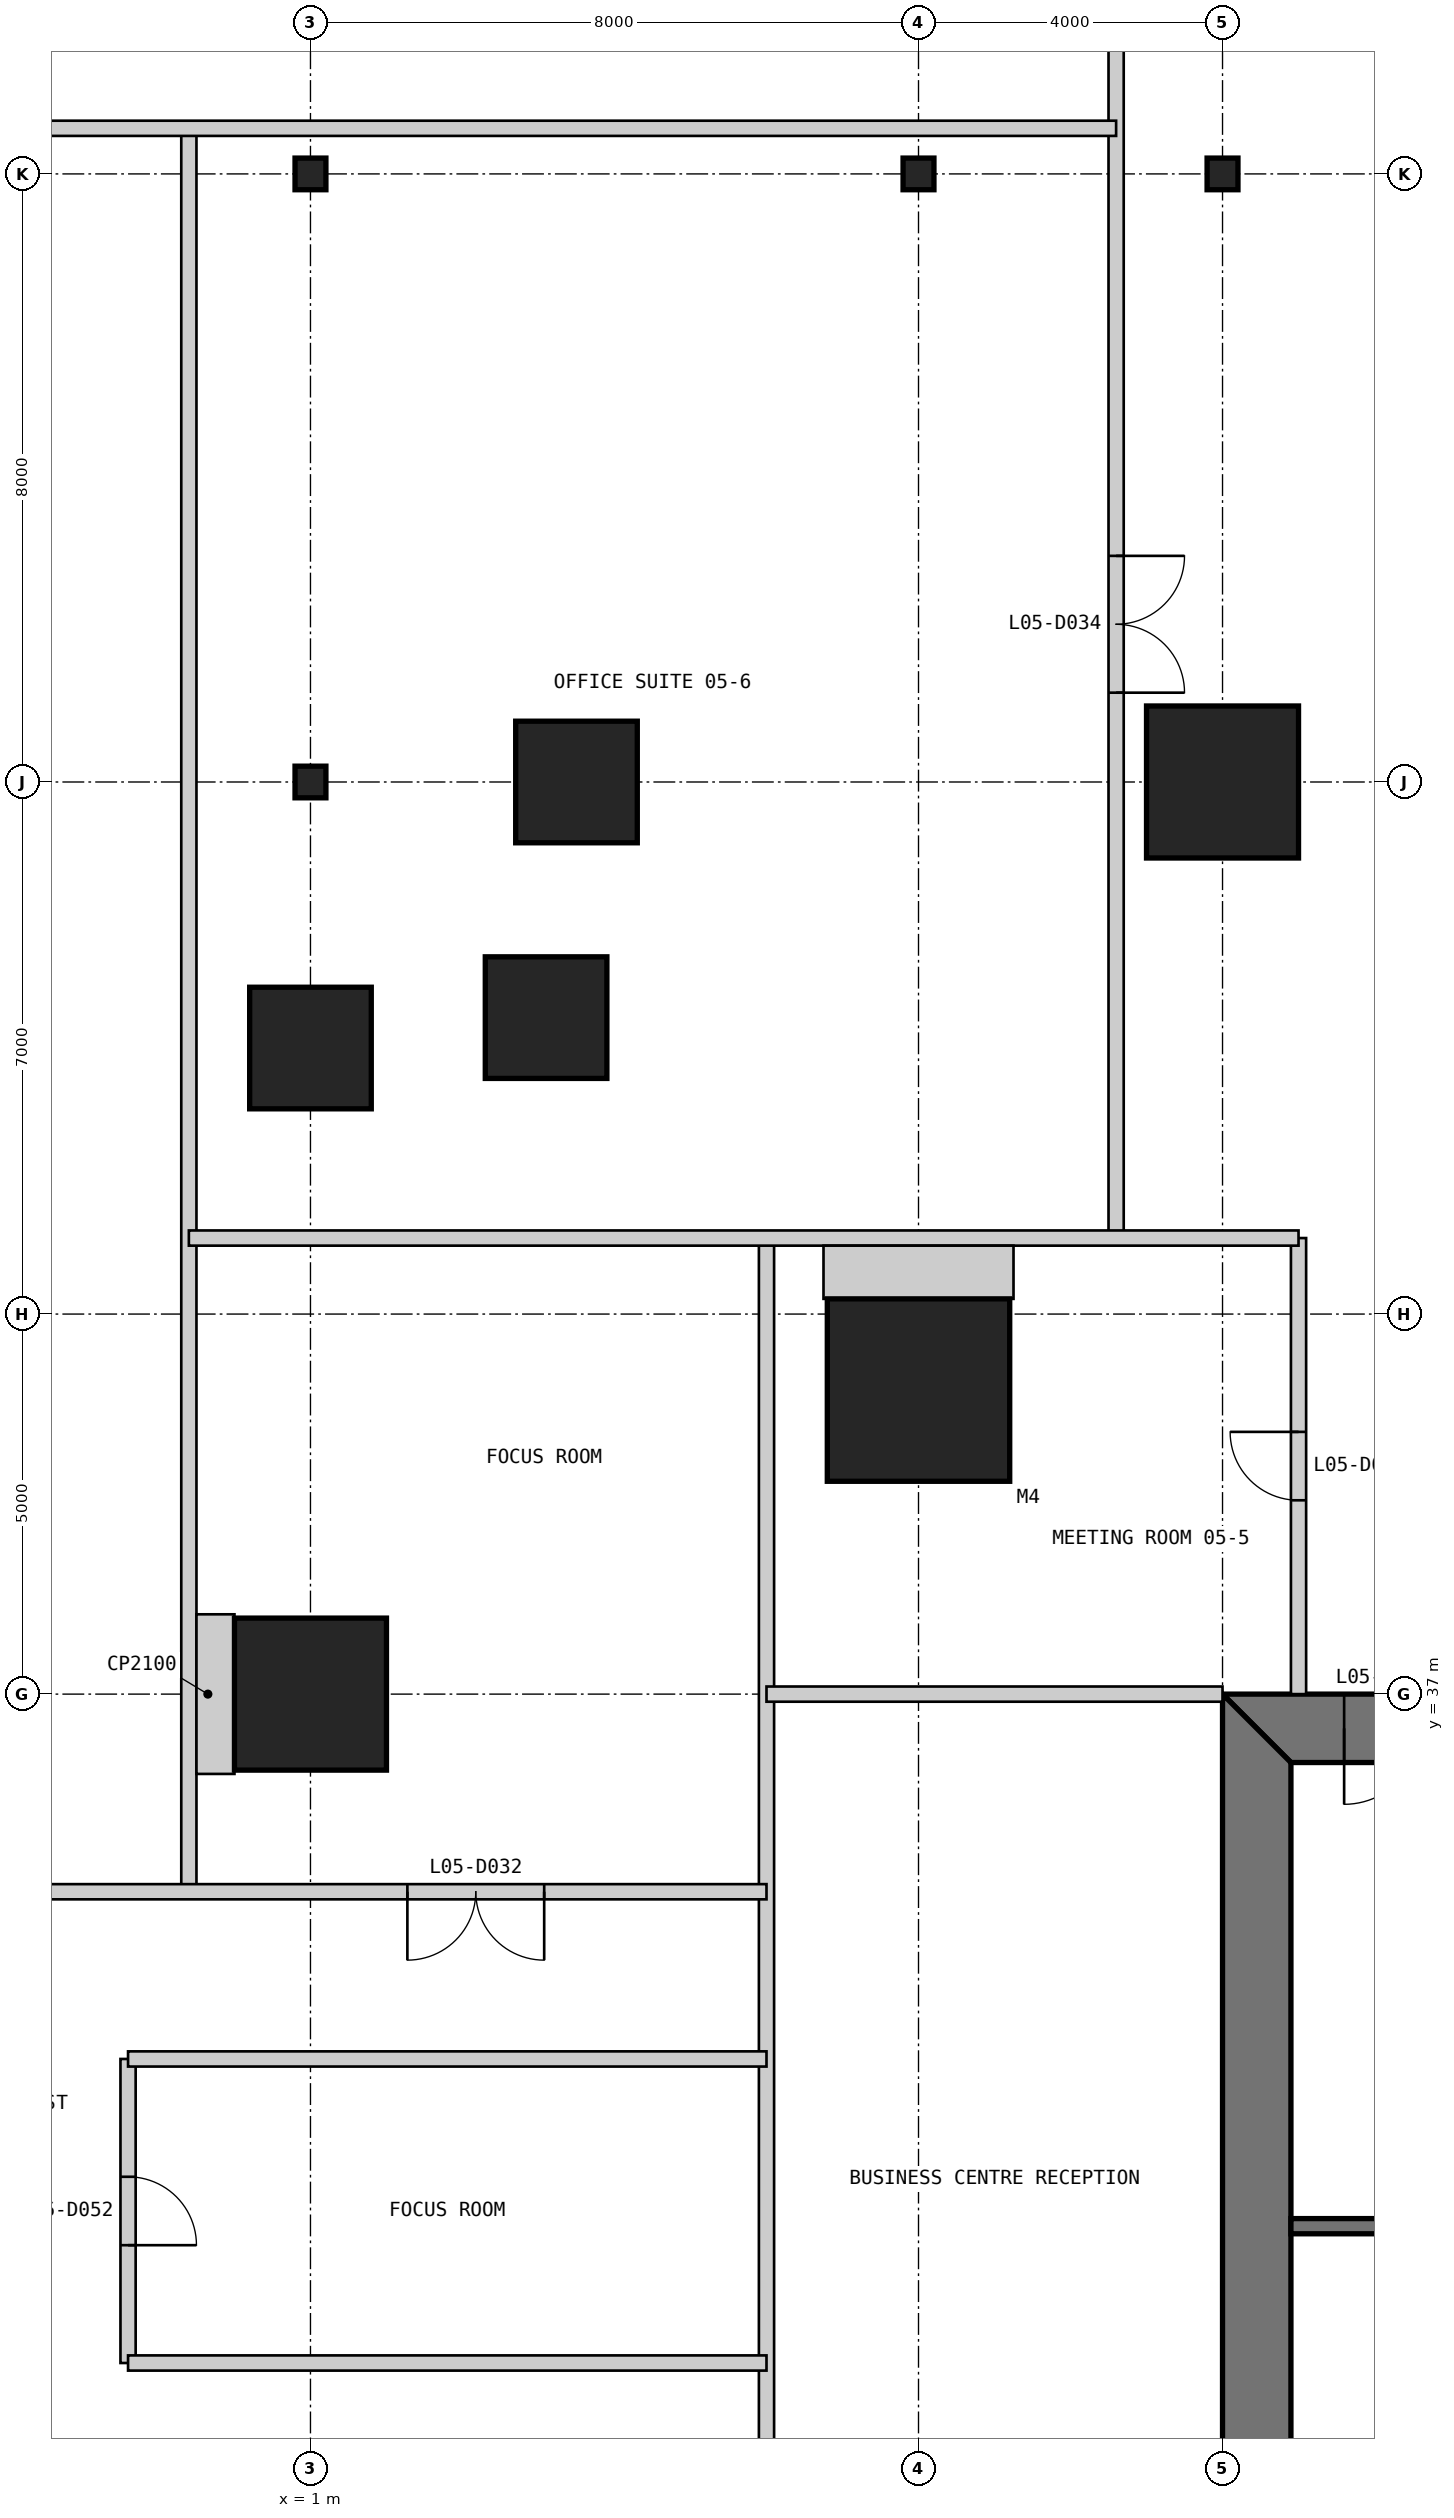
"""IFC4 building model, lengths in metres.
Left out: names, types, materials, properties, quantities, classifications, styles, units other than length and angle.
Written with IfcOpenShell. Run it as: python <this file> out.ifc"""

import sys

from ifc_helpers import new_model, si_unit, direction, frame, frame_2d, origin, origin_2d, place, context, subcontext, project, spatial, polyline, rectangle, i_section, outline, extrude, element, fill, save


model = new_model("IFC4")
c1 = context("Model", 3, precision=1e-05, world=origin(), true_north=direction((0.0, 1.0)))
c2 = subcontext(c1, "Body", "Model", "MODEL_VIEW")
j1 = project(units=[si_unit("LENGTHUNIT", "METRE"), si_unit("PLANEANGLEUNIT", "RADIAN")], contexts=[c1])
p1 = place(None, origin())
s1 = spatial("IfcSite", under=j1, at=p1, CompositionType="ELEMENT")
p2 = place(p1, origin())
s2 = spatial("IfcBuilding", under=s1, at=p2, CompositionType="ELEMENT")
p3 = place(p2, frame((0.0, 0.0, 26.2)))
s3 = spatial("IfcBuildingStorey", under=s2, at=p3, CompositionType="ELEMENT", Elevation=26.2)
p4 = place(p3, frame((9.0, 41.0, 0.0), z_axis=(0.0, 0.0, 1.0), x_axis=(1.0, 0.0, 0.0)))
e1 = element("IfcColumn", 1, at=p4, inside=s3, PredefinedType="COLUMN", context=c2, shape_type="SweptSolid", body=[
    extrude(rectangle(XDim=2.4, YDim=2.4, at=origin_2d()), origin(), (0.0, 0.0, 1.0), 4.8),
])
p5 = place(p3, frame((13.0, 49.0, 0.0), z_axis=(0.0, 0.0, 1.0), x_axis=(1.0, 0.0, 0.0)))
e2 = element("IfcColumn", 2, at=p5, inside=s3, PredefinedType="COLUMN", context=c2, shape_type="SweptSolid", body=[
    extrude(rectangle(XDim=2.0, YDim=2.0, at=origin_2d()), origin(), (0.0, 0.0, 1.0), 4.8),
])
for number, where, z_axis, x_axis in (
    (3, (4.5, 49.0, 0.0), (0.0, 0.0, 1.0), (1.0, 0.0, 0.0)),
    (4, (4.1, 45.9, 0.0), (0.0, 0.0, 1.0), (1.0, 0.0, 0.0)),
    (5, (1.0, 45.5, 0.0), (0.0, 0.0, 1.0), (1.0, 0.0, 0.0)),
):
    element("IfcColumn", number, at=place(p3, frame(where, z_axis=z_axis, x_axis=x_axis)), inside=s3, PredefinedType="COLUMN", context=c2, shape_type="SweptSolid", body=[
        extrude(rectangle(XDim=1.6, YDim=1.6, at=origin_2d()), origin(), (0.0, 0.0, 1.0), 4.8),
    ])
p6 = place(p3, frame((1.0, 37.0, 0.0), z_axis=(0.0, 0.0, 1.0), x_axis=(1.0, 0.0, 0.0)))
e6 = element("IfcColumn", 6, at=p6, inside=s3, PredefinedType="COLUMN", context=c2, shape_type="SweptSolid", body=[
    extrude(rectangle(XDim=2.0, YDim=2.0, at=origin_2d()), origin(), (0.0, 0.0, 1.0), 4.8),
])
for number, where, z_axis, x_axis in (
    (7, (1.0, 49.0, 0.0), (0.0, 0.0, 1.0), (1.0, 0.0, 0.0)),
    (8, (1.0, 57.0, 0.0), (0.0, 0.0, 1.0), (1.0, 0.0, 0.0)),
    (9, (9.0, 57.0, 0.0), (0.0, 0.0, 1.0), (1.0, 0.0, 0.0)),
    (10, (13.0, 57.0, 0.0), (0.0, 0.0, 1.0), (1.0, 0.0, 0.0)),
):
    element("IfcColumn", number, at=place(p3, frame(where, z_axis=z_axis, x_axis=x_axis)), inside=s3, PredefinedType="COLUMN", context=c2, shape_type="SweptSolid", body=[
        extrude(i_section(OverallWidth=0.406, OverallDepth=0.417, WebThickness=0.03, FlangeThickness=0.048, at=origin_2d()), origin(), (0.0, 0.0, 1.0), 4.8),
    ])
p7 = place(p3, frame((37.0, 36.55, 0.0), z_axis=(0.0, 0.0, 1.0), x_axis=(-1.0, 0.0, 0.0)))
e11 = element("IfcWall", 11, at=p7, inside=s3, PredefinedType="SHEAR", context=c2, shape_type="SweptSolid", body=[
    extrude(outline(polyline([(0.0, -0.45), (24.0, -0.45), (23.1, 0.45), (0.9, 0.45), (0.0, -0.45)])), origin(), (0.0, 0.0, 1.0), 4.8),
])
p8 = place(p7, frame((4.9, 0.0, 0.0)))
e12 = element("IfcOpeningElement", 12, at=p8, cuts=e11, PredefinedType="OPENING", context=c2, shape_type="SweptSolid", body=[
    extrude(rectangle(XDim=1.0, YDim=2.2, at=frame_2d((0.5, 1.1))), frame((0.0, 0.46, 0.0), z_axis=(0.0, -1.0, 0.0), x_axis=(1.0, 0.0, 0.0)), (0.0, 0.0, 1.0), 0.92),
])
p9 = place(p7, frame((8.9, 0.0, 0.0)))
e13 = element("IfcOpeningElement", 13, at=p9, cuts=e11, PredefinedType="OPENING", context=c2, shape_type="SweptSolid", body=[
    extrude(rectangle(XDim=1.1, YDim=2.2, at=frame_2d((0.55, 1.1))), frame((0.0, 0.46, 0.0), z_axis=(0.0, -1.0, 0.0), x_axis=(1.0, 0.0, 0.0)), (0.0, 0.0, 1.0), 0.92),
])
p10 = place(p7, frame((15.05, 0.0, 0.0)))
e14 = element("IfcOpeningElement", 14, at=p10, cuts=e11, PredefinedType="OPENING", context=c2, shape_type="SweptSolid", body=[
    extrude(rectangle(XDim=0.9, YDim=2.2, at=frame_2d((0.45, 1.1))), frame((0.0, 0.46, 0.0), z_axis=(0.0, -1.0, 0.0), x_axis=(1.0, 0.0, 0.0)), (0.0, 0.0, 1.0), 0.92),
])
p11 = place(p7, frame((17.9, 0.0, 0.0)))
e15 = element("IfcOpeningElement", 15, at=p11, cuts=e11, PredefinedType="OPENING", context=c2, shape_type="SweptSolid", body=[
    extrude(rectangle(XDim=1.0, YDim=2.2, at=frame_2d((0.5, 1.1))), frame((0.0, 0.46, 0.0), z_axis=(0.0, -1.0, 0.0), x_axis=(1.0, 0.0, 0.0)), (0.0, 0.0, 1.0), 0.92),
])
p12 = place(p7, frame((21.4, 0.0, 0.0)))
e16 = element("IfcOpeningElement", 16, at=p12, cuts=e11, PredefinedType="OPENING", context=c2, shape_type="SweptSolid", body=[
    extrude(rectangle(XDim=1.0, YDim=2.2, at=frame_2d((0.5, 1.1))), frame((0.0, 0.46, 0.0), z_axis=(0.0, -1.0, 0.0), x_axis=(1.0, 0.0, 0.0)), (0.0, 0.0, 1.0), 0.92),
])
p13 = place(p3, frame((13.45, 36.1, 0.0), z_axis=(0.0, 0.0, 1.0), x_axis=(0.0, -1.0, 0.0)))
e17 = element("IfcWall", 17, at=p13, inside=s3, PredefinedType="SHEAR", context=c2, shape_type="SweptSolid", body=[
    extrude(outline(polyline([(-0.9, -0.45), (23.1, -0.45), (22.2, 0.45), (0.0, 0.45), (-0.9, -0.45)])), origin(), (0.0, 0.0, 1.0), 4.8),
])
p14 = place(p13, frame((20.2, 0.0, 0.0)))
e18 = element("IfcOpeningElement", 18, at=p14, cuts=e17, PredefinedType="OPENING", context=c2, shape_type="SweptSolid", body=[
    extrude(rectangle(XDim=1.0, YDim=2.2, at=frame_2d((0.5, 1.1))), frame((0.0, 0.46, 0.0), z_axis=(0.0, -1.0, 0.0), x_axis=(1.0, 0.0, 0.0)), (0.0, 0.0, 1.0), 0.92),
])
p15 = place(p13, frame((17.25, 0.0, 0.0)))
e19 = element("IfcOpeningElement", 19, at=p15, cuts=e17, PredefinedType="OPENING", context=c2, shape_type="SweptSolid", body=[
    extrude(rectangle(XDim=0.9, YDim=2.2, at=frame_2d((0.45, 1.1))), frame((0.0, 0.46, 0.0), z_axis=(0.0, -1.0, 0.0), x_axis=(1.0, 0.0, 0.0)), (0.0, 0.0, 1.0), 0.92),
])
p16 = place(p3, frame((29.7, 30.0, 0.0), z_axis=(0.0, 0.0, 1.0), x_axis=(-1.0, 0.0, 0.0)))
e20 = element("IfcWall", 20, at=p16, inside=s3, PredefinedType="SOLIDWALL", context=c2, shape_type="SweptSolid", body=[
    extrude(rectangle(XDim=15.8, YDim=0.2, at=frame_2d((7.9, 0.0))), origin(), (0.0, 0.0, 1.0), 4.6),
])
p17 = place(p3, frame((-1.4, 28.2, 0.0), z_axis=(0.0, 0.0, 1.0), x_axis=(0.0, 1.0, 0.0)))
e21 = element("IfcWall", 21, at=p17, inside=s3, PredefinedType="PARTITIONING", context=c2, shape_type="SweptSolid", body=[
    extrude(rectangle(XDim=4.0, YDim=0.2, at=frame_2d((2.0, 0.0))), origin(), (0.0, 0.0, 1.0), 4.5),
])
p18 = place(p17, frame((1.55, 0.0, 0.0)))
e22 = element("IfcOpeningElement", 22, at=p18, cuts=e21, PredefinedType="OPENING", context=c2, shape_type="SweptSolid", body=[
    extrude(rectangle(XDim=0.9, YDim=2.2, at=frame_2d((0.45, 1.1))), frame((0.0, 0.11, 0.0), z_axis=(0.0, -1.0, 0.0), x_axis=(1.0, 0.0, 0.0)), (0.0, 0.0, 1.0), 0.22),
])
p19 = place(p3, frame((-0.6, 34.4, 0.0), z_axis=(0.0, 0.0, 1.0), x_axis=(0.0, 1.0, 0.0)))
e23 = element("IfcWall", 23, at=p19, inside=s3, PredefinedType="PARTITIONING", context=c2, shape_type="SweptSolid", body=[
    extrude(rectangle(XDim=23.2, YDim=0.2, at=frame_2d((11.6, 0.0))), origin(), (0.0, 0.0, 1.0), 4.5),
])
p20 = place(p3, frame((7.0, 18.0, 0.0), z_axis=(0.0, 0.0, 1.0), x_axis=(0.0, 1.0, 0.0)))
e24 = element("IfcWall", 24, at=p20, inside=s3, PredefinedType="PARTITIONING", context=c2, shape_type="SweptSolid", body=[
    extrude(rectangle(XDim=25.0, YDim=0.2, at=frame_2d((12.5, 0.0))), origin(), (0.0, 0.0, 1.0), 3.893),
])
p21 = place(p3, frame((11.6, 43.0, 0.0), z_axis=(0.0, 0.0, 1.0), x_axis=(0.0, 1.0, 0.0)))
e25 = element("IfcWall", 25, at=p21, inside=s3, PredefinedType="PARTITIONING", context=c2, shape_type="SweptSolid", body=[
    extrude(rectangle(XDim=22.25, YDim=0.2, at=frame_2d((11.125, 0.0))), origin(), (0.0, 0.0, 1.0), 4.5),
])
p22 = place(p21, frame((7.175, 0.0, 0.0)))
e26 = element("IfcOpeningElement", 26, at=p22, cuts=e25, PredefinedType="OPENING", context=c2, shape_type="SweptSolid", body=[
    extrude(rectangle(XDim=1.8, YDim=2.4, at=frame_2d((0.9, 1.2))), frame((0.0, 0.11, 0.0), z_axis=(0.0, -1.0, 0.0), x_axis=(1.0, 0.0, 0.0)), (0.0, 0.0, 1.0), 0.22),
])
p23 = place(p21, frame((17.5, 0.0, 0.0)))
e27 = element("IfcOpeningElement", 27, at=p23, cuts=e25, PredefinedType="OPENING", context=c2, shape_type="SweptSolid", body=[
    extrude(rectangle(XDim=1.8, YDim=2.4, at=frame_2d((0.9, 1.2))), frame((0.0, 0.11, 0.0), z_axis=(0.0, -1.0, 0.0), x_axis=(1.0, 0.0, 0.0)), (0.0, 0.0, 1.0), 0.22),
])
p24 = place(p3, frame((14.0, 37.0, 0.0), z_axis=(0.0, 0.0, 1.0), x_axis=(0.0, 1.0, 0.0)))
e28 = element("IfcWall", 28, at=p24, inside=s3, PredefinedType="PARTITIONING", context=c2, shape_type="SweptSolid", body=[
    extrude(rectangle(XDim=6.0, YDim=0.2, at=frame_2d((3.0, 0.0))), origin(), (0.0, 0.0, 1.0), 4.5),
])
p25 = place(p24, frame((2.55, 0.0, 0.0)))
e29 = element("IfcOpeningElement", 29, at=p25, cuts=e28, PredefinedType="OPENING", context=c2, shape_type="SweptSolid", body=[
    extrude(rectangle(XDim=0.9, YDim=2.2, at=frame_2d((0.45, 1.1))), frame((0.0, 0.11, 0.0), z_axis=(0.0, -1.0, 0.0), x_axis=(1.0, 0.0, 0.0)), (0.0, 0.0, 1.0), 0.22),
])
for number, where, z_axis, x_axis in (
    (30, (-1.4, 28.2, 0.0), (0.0, 0.0, 1.0), (1.0, 0.0, 0.0)),
    (31, (-1.4, 32.2, 0.0), (0.0, 0.0, 1.0), (1.0, 0.0, 0.0)),
):
    element("IfcWall", number, at=place(p3, frame(where, z_axis=z_axis, x_axis=x_axis)), inside=s3, PredefinedType="PARTITIONING", context=c2, shape_type="SweptSolid", body=[
        extrude(rectangle(XDim=8.4, YDim=0.2, at=frame_2d((4.2, 0.0))), origin(), (0.0, 0.0, 1.0), 4.5),
    ])
p26 = place(p3, frame((-7.25, 34.4, 0.0), z_axis=(0.0, 0.0, 1.0), x_axis=(1.0, 0.0, 0.0)))
e32 = element("IfcWall", 32, at=p26, inside=s3, PredefinedType="PARTITIONING", context=c2, shape_type="SweptSolid", body=[
    extrude(rectangle(XDim=14.25, YDim=0.2, at=frame_2d((7.125, 0.0))), origin(), (0.0, 0.0, 1.0), 4.5),
])
p27 = place(p26, frame((9.525, 0.0, 0.0)))
e33 = element("IfcOpeningElement", 33, at=p27, cuts=e32, PredefinedType="OPENING", context=c2, shape_type="SweptSolid", body=[
    extrude(rectangle(XDim=1.8, YDim=2.4, at=frame_2d((0.9, 1.2))), frame((0.0, 0.11, 0.0), z_axis=(0.0, -1.0, 0.0), x_axis=(1.0, 0.0, 0.0)), (0.0, 0.0, 1.0), 0.22),
])
p28 = place(p26, frame((2.45, 0.0, 0.0)))
e34 = element("IfcOpeningElement", 34, at=p28, cuts=e32, PredefinedType="OPENING", context=c2, shape_type="SweptSolid", body=[
    extrude(rectangle(XDim=1.8, YDim=2.4, at=frame_2d((0.9, 1.2))), frame((0.0, 0.11, 0.0), z_axis=(0.0, -1.0, 0.0), x_axis=(1.0, 0.0, 0.0)), (0.0, 0.0, 1.0), 0.22),
])
p29 = place(p3, frame((7.0, 37.0, 0.0), z_axis=(0.0, 0.0, 1.0), x_axis=(1.0, 0.0, 0.0)))
e35 = element("IfcWall", 35, at=p29, inside=s3, PredefinedType="PARTITIONING", context=c2, shape_type="SweptSolid", body=[
    extrude(rectangle(XDim=6.0, YDim=0.2, at=frame_2d((3.0, 0.0))), origin(), (0.0, 0.0, 1.0), 3.703),
])
p30 = place(p3, frame((-0.6, 43.0, 0.0), z_axis=(0.0, 0.0, 1.0), x_axis=(1.0, 0.0, 0.0)))
e36 = element("IfcWall", 36, at=p30, inside=s3, PredefinedType="PARTITIONING", context=c2, shape_type="SweptSolid", body=[
    extrude(rectangle(XDim=14.6, YDim=0.2, at=frame_2d((7.3, 0.0))), origin(), (0.0, 0.0, 1.0), 4.5),
])
p31 = place(p3, frame((-7.25, 57.6, 0.0), z_axis=(0.0, 0.0, 1.0), x_axis=(1.0, 0.0, 0.0)))
e37 = element("IfcWall", 37, at=p31, inside=s3, PredefinedType="PARTITIONING", context=c2, shape_type="SweptSolid", body=[
    extrude(rectangle(XDim=18.85, YDim=0.2, at=frame_2d((9.425, 0.0))), origin(), (0.0, 0.0, 1.0), 4.5),
])
p32 = place(p3, frame((-0.5, 37.0, 0.0), z_axis=(0.0, 0.0, 1.0), x_axis=(1.0, 0.0, 0.0)))
e38 = element("IfcWall", 38, at=p32, inside=s3, PredefinedType="PARTITIONING", context=c2, shape_type="SweptSolid", body=[
    extrude(rectangle(XDim=0.5, YDim=2.1, at=frame_2d((0.25, 0.0))), origin(), (0.0, 0.0, 1.0), 4.5),
])
p33 = place(p3, frame((9.0, 42.9, 0.0), z_axis=(0.0, 0.0, 1.0), x_axis=(0.0, -1.0, 0.0)))
e39 = element("IfcWall", 39, at=p33, inside=s3, PredefinedType="PARTITIONING", context=c2, shape_type="SweptSolid", body=[
    extrude(rectangle(XDim=0.7, YDim=2.5, at=frame_2d((0.35, 0.0))), origin(), (0.0, 0.0, 1.0), 4.5),
])
p34 = place(p12, origin())
e40 = element("IfcDoor", 40, at=p34, inside=s3, OperationType="SINGLE_SWING_RIGHT", PredefinedType="DOOR", context=c2, shape_type="SweptSolid", body=[
    extrude(rectangle(XDim=1.0, YDim=2.2, at=frame_2d((0.5, 1.1))), frame((0.0, 0.025, 0.0), z_axis=(0.0, -1.0, 0.0), x_axis=(1.0, 0.0, 0.0)), (0.0, 0.0, 1.0), 0.05),
    extrude(outline(polyline([(0.0, 0.0), (0.04, 0.0), (0.04, 2.16), (0.96, 2.16), (0.96, 0.0), (1.0, 0.0), (1.0, 2.2), (0.0, 2.2), (0.0, 0.0)])), frame((0.0, 0.3, 0.0), z_axis=(0.0, -1.0, 0.0), x_axis=(1.0, 0.0, 0.0)), (0.0, 0.0, 1.0), 0.6),
])
fill(e16, e40)
p35 = place(p27, frame((1.8, 0.0, 0.0), z_axis=(0.0, 0.0, 1.0), x_axis=(-1.0, 0.0, 0.0)))
e41 = element("IfcDoor", 41, at=p35, inside=s3, OperationType="DOUBLE_DOOR_SINGLE_SWING", PredefinedType="DOOR", context=c2, shape_type="SweptSolid", body=[
    extrude(rectangle(XDim=1.8, YDim=2.4, at=frame_2d((0.9, 1.2))), frame((0.0, 0.025, 0.0), z_axis=(0.0, -1.0, 0.0), x_axis=(1.0, 0.0, 0.0)), (0.0, 0.0, 1.0), 0.05),
])
fill(e33, e41)
p36 = place(p22, frame((1.8, 0.0, 0.0), z_axis=(0.0, 0.0, 1.0), x_axis=(-1.0, 0.0, 0.0)))
e42 = element("IfcDoor", 42, at=p36, inside=s3, OperationType="DOUBLE_DOOR_SINGLE_SWING", PredefinedType="DOOR", context=c2, shape_type="SweptSolid", body=[
    extrude(rectangle(XDim=1.8, YDim=2.4, at=frame_2d((0.9, 1.2))), frame((0.0, 0.025, 0.0), z_axis=(0.0, -1.0, 0.0), x_axis=(1.0, 0.0, 0.0)), (0.0, 0.0, 1.0), 0.05),
])
fill(e26, e42)
p37 = place(p25, origin())
e43 = element("IfcDoor", 43, at=p37, inside=s3, OperationType="SINGLE_SWING_RIGHT", PredefinedType="DOOR", context=c2, shape_type="SweptSolid", body=[
    extrude(rectangle(XDim=0.9, YDim=2.2, at=frame_2d((0.45, 1.1))), frame((0.0, 0.025, 0.0), z_axis=(0.0, -1.0, 0.0), x_axis=(1.0, 0.0, 0.0)), (0.0, 0.0, 1.0), 0.05),
])
fill(e29, e43)
p38 = place(p18, frame((0.9, 0.0, 0.0), z_axis=(0.0, 0.0, 1.0), x_axis=(-1.0, 0.0, 0.0)))
e44 = element("IfcDoor", 44, at=p38, inside=s3, OperationType="SINGLE_SWING_RIGHT", PredefinedType="DOOR", context=c2, shape_type="SweptSolid", body=[
    extrude(rectangle(XDim=0.9, YDim=2.2, at=frame_2d((0.45, 1.1))), frame((0.0, 0.025, 0.0), z_axis=(0.0, -1.0, 0.0), x_axis=(1.0, 0.0, 0.0)), (0.0, 0.0, 1.0), 0.05),
])
fill(e22, e44)
save(model, sys.argv[1])
